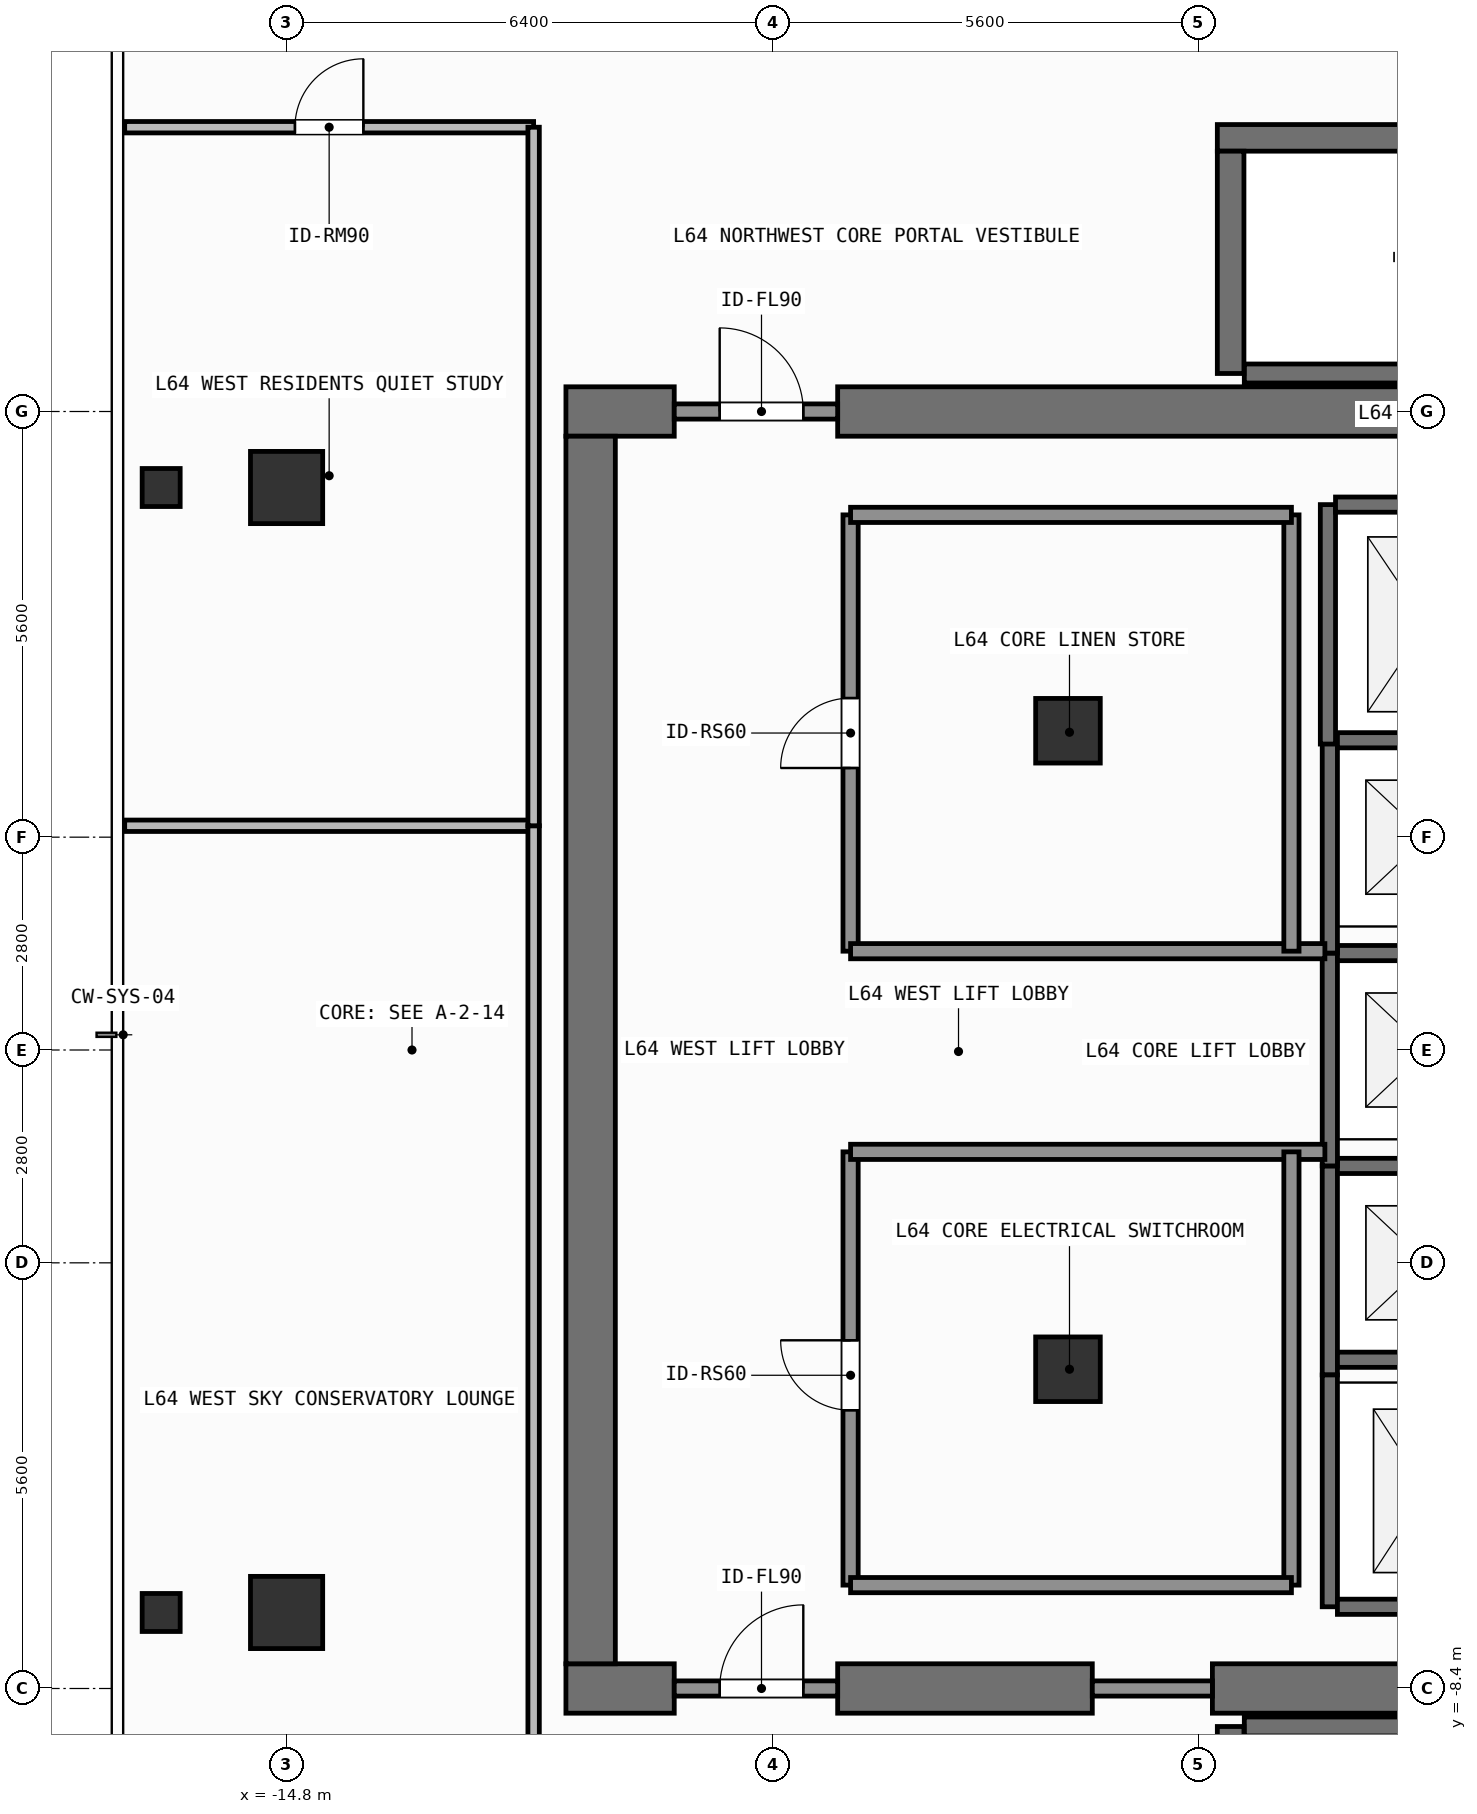
"""IFC4 building model, lengths in metres.
Left out: names, types, materials, properties, quantities, classifications, styles, units other than length and angle.
Written with IfcOpenShell. Run it as: python <this file> out.ifc"""

import sys

from ifc_helpers import new_model, si_unit, direction, frame, frame_2d, origin, origin_2d, place, context, subcontext, project, spatial, rectangle, hollow_rectangle, extrude, element, fill, save


model = new_model("IFC4")
c1 = context("Model", 3, precision=1e-05, world=origin(), true_north=direction((0.0, 1.0)))
c2 = subcontext(c1, "Body", "Model", "MODEL_VIEW")
j1 = project(units=[si_unit("LENGTHUNIT", "METRE"), si_unit("PLANEANGLEUNIT", "RADIAN")], contexts=[c1])
p1 = place(None, origin())
s1 = spatial("IfcSite", under=j1, at=p1, CompositionType="ELEMENT")
p2 = place(p1, origin())
s2 = spatial("IfcBuilding", under=s1, at=p2, CompositionType="ELEMENT")
p3 = place(p2, frame((0.0, 0.0, 262.5)))
s3 = spatial("IfcBuildingStorey", under=s2, at=p3, CompositionType="ELEMENT", Elevation=262.5)
p4 = place(p3, frame((-11.125, -8.4, 0.0), z_axis=(0.0, 0.0, 1.0), x_axis=(1.0, 0.0, 0.0)))
e1 = element("IfcWall", 1, at=p4, inside=s3, PredefinedType="SHEAR", context=c2, shape_type="SweptSolid", body=[
    extrude(rectangle(XDim=1.425, YDim=0.65, at=frame_2d((0.712, 0.0))), origin(), (0.0, 0.0, 1.0), 3.9),
])
p5 = place(p3, frame((-7.55, -8.4, 0.0), z_axis=(0.0, 0.0, 1.0), x_axis=(1.0, 0.0, 0.0)))
e2 = element("IfcWall", 2, at=p5, inside=s3, PredefinedType="SHEAR", context=c2, shape_type="SweptSolid", body=[
    extrude(rectangle(XDim=3.35, YDim=0.65, at=frame_2d((1.675, 0.0))), origin(), (0.0, 0.0, 1.0), 3.9),
])
p6 = place(p3, frame((-2.62, -8.4, 0.0), z_axis=(0.0, 0.0, 1.0), x_axis=(1.0, 0.0, 0.0)))
e3 = element("IfcWall", 3, at=p6, inside=s3, PredefinedType="SHEAR", context=c2, shape_type="SweptSolid", body=[
    extrude(rectangle(XDim=7.27, YDim=0.65, at=frame_2d((3.635, 0.0))), origin(), (0.0, 0.0, 1.0), 3.9),
])
p7 = place(p3, frame((-11.125, 8.4, 0.0), z_axis=(0.0, 0.0, 1.0), x_axis=(1.0, 0.0, 0.0)))
e4 = element("IfcWall", 4, at=p7, inside=s3, PredefinedType="SHEAR", context=c2, shape_type="SweptSolid", body=[
    extrude(rectangle(XDim=1.425, YDim=0.65, at=frame_2d((0.712, 0.0))), origin(), (0.0, 0.0, 1.0), 3.9),
])
p8 = place(p3, frame((-7.55, 8.4, 0.0), z_axis=(0.0, 0.0, 1.0), x_axis=(1.0, 0.0, 0.0)))
e5 = element("IfcWall", 5, at=p8, inside=s3, PredefinedType="SHEAR", context=c2, shape_type="SweptSolid", body=[
    extrude(rectangle(XDim=16.275, YDim=0.65, at=frame_2d((8.138, 0.0))), origin(), (0.0, 0.0, 1.0), 3.9),
])
p9 = place(p3, frame((-10.8, -8.075, 0.0), z_axis=(0.0, 0.0, 1.0), x_axis=(0.0, 1.0, 0.0)))
e6 = element("IfcWall", 6, at=p9, inside=s3, PredefinedType="SHEAR", context=c2, shape_type="SweptSolid", body=[
    extrude(rectangle(XDim=16.15, YDim=0.65, at=frame_2d((8.075, 0.0))), origin(), (0.0, 0.0, 1.0), 3.9),
])
p10 = place(p3, frame((-2.2, -8.9, 0.0), z_axis=(0.0, 0.0, 1.0), x_axis=(1.0, 0.0, 0.0)))
e7 = element("IfcWall", 7, at=p10, inside=s3, PredefinedType="SHEAR", context=c2, shape_type="SweptSolid", body=[
    extrude(rectangle(XDim=6.6, YDim=0.25, at=frame_2d((3.3, 0.0))), origin(), (0.0, 0.0, 1.0), 3.9),
])
p11 = place(p3, frame((-2.38, -11.825, 0.0), z_axis=(0.0, 0.0, 1.0), x_axis=(0.0, 1.0, 0.0)))
e8 = element("IfcWall", 8, at=p11, inside=s3, PredefinedType="SHEAR", context=c2, shape_type="SweptSolid", body=[
    extrude(rectangle(XDim=2.925, YDim=0.35, at=frame_2d((1.462, 0.0))), origin(), (0.0, 0.0, 1.0), 3.9),
])
p12 = place(p3, frame((-2.555, 12.0, 0.0), z_axis=(0.0, 0.0, 1.0), x_axis=(1.0, 0.0, 0.0)))
e9 = element("IfcWall", 9, at=p12, inside=s3, PredefinedType="SHEAR", context=c2, shape_type="SweptSolid", body=[
    extrude(rectangle(XDim=7.31, YDim=0.35, at=frame_2d((3.655, 0.0))), origin(), (0.0, 0.0, 1.0), 3.9),
])
p13 = place(p3, frame((-2.2, 8.9, 0.0), z_axis=(0.0, 0.0, 1.0), x_axis=(1.0, 0.0, 0.0)))
e10 = element("IfcWall", 10, at=p13, inside=s3, PredefinedType="SHEAR", context=c2, shape_type="SweptSolid", body=[
    extrude(rectangle(XDim=6.6, YDim=0.25, at=frame_2d((3.3, 0.0))), origin(), (0.0, 0.0, 1.0), 3.9),
])
p14 = place(p3, frame((-2.38, 8.9, 0.0), z_axis=(0.0, 0.0, 1.0), x_axis=(0.0, 1.0, 0.0)))
e11 = element("IfcWall", 11, at=p14, inside=s3, PredefinedType="SHEAR", context=c2, shape_type="SweptSolid", body=[
    extrude(rectangle(XDim=2.925, YDim=0.35, at=frame_2d((1.462, 0.0))), origin(), (0.0, 0.0, 1.0), 3.9),
])
for number, where, z_axis, x_axis in (
    (12, (-14.8, -7.4, 0.0), (0.0, 0.0, 1.0), (1.0, 0.0, 0.0)),
    (13, (-14.8, 7.4, 0.0), (0.0, 0.0, 1.0), (1.0, 0.0, 0.0)),
):
    element("IfcColumn", number, at=place(p3, frame(where, z_axis=z_axis, x_axis=x_axis)), inside=s3, PredefinedType="COLUMN", context=c2, shape_type="SweptSolid", body=[
        extrude(rectangle(XDim=0.95, YDim=0.95, at=origin_2d()), origin(), (0.0, 0.0, 1.0), 3.9),
    ])
for number, where, z_axis, x_axis in (
    (14, (-4.52, -4.2, 0.0), (0.0, 0.0, 1.0), (1.0, 0.0, 0.0)),
    (15, (-4.52, 4.2, 0.0), (0.0, 0.0, 1.0), (1.0, 0.0, 0.0)),
):
    element("IfcColumn", number, at=place(p3, frame(where, z_axis=z_axis, x_axis=x_axis)), inside=s3, PredefinedType="COLUMN", context=c2, shape_type="SweptSolid", body=[
        extrude(rectangle(XDim=0.85, YDim=0.85, at=origin_2d()), origin(), (0.0, 0.0, 1.0), 3.9),
    ])
for number, where, z_axis, x_axis in (
    (16, (-16.45, -7.4, 0.0), (0.0, 0.0, 1.0), (1.0, 0.0, 0.0)),
    (17, (-16.45, 7.4, 0.0), (0.0, 0.0, 1.0), (1.0, 0.0, 0.0)),
):
    element("IfcColumn", number, at=place(p3, frame(where, z_axis=z_axis, x_axis=x_axis)), inside=s3, PredefinedType="COLUMN", context=c2, shape_type="SweptSolid", body=[
        extrude(hollow_rectangle(XDim=0.5, YDim=0.5, WallThickness=0.025, at=origin_2d()), origin(), (0.0, 0.0, 1.0), 3.9),
    ])
p15 = place(p3, frame((-1.075, -4.275, 0.0), z_axis=(0.0, 0.0, 1.0), x_axis=(0.0, 1.0, 0.0)))
e18 = element("IfcWall", 18, at=p15, inside=s3, PredefinedType="SHEAR", context=c2, shape_type="SweptSolid", body=[
    extrude(rectangle(XDim=2.75, YDim=0.2, at=frame_2d((1.375, 0.0))), origin(), (0.0, 0.0, 1.0), 3.68),
])
for number, where, z_axis, x_axis in (
    (19, (-0.975, -4.075, 0.0), (0.0, 0.0, 1.0), (1.0, 0.0, 0.0)),
    (20, (-0.975, -1.525, 0.0), (0.0, 0.0, 1.0), (1.0, 0.0, 0.0)),
):
    element("IfcWall", number, at=place(p3, frame(where, z_axis=z_axis, x_axis=x_axis)), inside=s3, PredefinedType="SHEAR", context=c2, shape_type="SweptSolid", body=[
        extrude(rectangle(XDim=2.35, YDim=0.2, at=frame_2d((1.175, 0.0))), origin(), (0.0, 0.0, 1.0), 3.68),
    ])
p16 = place(p3, frame((-1.075, -1.525, 0.0), z_axis=(0.0, 0.0, 1.0), x_axis=(0.0, 1.0, 0.0)))
e21 = element("IfcWall", 21, at=p16, inside=s3, PredefinedType="SHEAR", context=c2, shape_type="SweptSolid", body=[
    extrude(rectangle(XDim=2.8, YDim=0.2, at=frame_2d((1.4, 0.0))), origin(), (0.0, 0.0, 1.0), 3.68),
])
p17 = place(p3, frame((-0.975, 1.275, 0.0), z_axis=(0.0, 0.0, 1.0), x_axis=(1.0, 0.0, 0.0)))
e22 = element("IfcWall", 22, at=p17, inside=s3, PredefinedType="SHEAR", context=c2, shape_type="SweptSolid", body=[
    extrude(rectangle(XDim=2.35, YDim=0.2, at=frame_2d((1.175, 0.0))), origin(), (0.0, 0.0, 1.0), 3.68),
])
p18 = place(p3, frame((-1.075, 1.275, 0.0), z_axis=(0.0, 0.0, 1.0), x_axis=(0.0, 1.0, 0.0)))
e23 = element("IfcWall", 23, at=p18, inside=s3, PredefinedType="SHEAR", context=c2, shape_type="SweptSolid", body=[
    extrude(rectangle(XDim=2.8, YDim=0.2, at=frame_2d((1.4, 0.0))), origin(), (0.0, 0.0, 1.0), 3.68),
])
p19 = place(p3, frame((-0.975, 4.075, 0.0), z_axis=(0.0, 0.0, 1.0), x_axis=(1.0, 0.0, 0.0)))
e24 = element("IfcWall", 24, at=p19, inside=s3, PredefinedType="SHEAR", context=c2, shape_type="SweptSolid", body=[
    extrude(rectangle(XDim=2.35, YDim=0.2, at=frame_2d((1.175, 0.0))), origin(), (0.0, 0.0, 1.0), 3.68),
])
p20 = place(p3, frame((-1.1, 4.025, 0.0), z_axis=(0.0, 0.0, 1.0), x_axis=(0.0, 1.0, 0.0)))
e25 = element("IfcWall", 25, at=p20, inside=s3, PredefinedType="SHEAR", context=c2, shape_type="SweptSolid", body=[
    extrude(rectangle(XDim=3.15, YDim=0.2, at=frame_2d((1.575, 0.0))), origin(), (0.0, 0.0, 1.0), 3.68),
])
p21 = place(p3, frame((-1.0, 7.175, 0.0), z_axis=(0.0, 0.0, 1.0), x_axis=(1.0, 0.0, 0.0)))
e26 = element("IfcWall", 26, at=p21, inside=s3, PredefinedType="SHEAR", context=c2, shape_type="SweptSolid", body=[
    extrude(rectangle(XDim=2.4, YDim=0.2, at=frame_2d((1.2, 0.0))), origin(), (0.0, 0.0, 1.0), 3.68),
])
p22 = place(p3, frame((-1.075, -7.325, 0.0), z_axis=(0.0, 0.0, 1.0), x_axis=(0.0, 1.0, 0.0)))
e27 = element("IfcWall", 27, at=p22, inside=s3, PredefinedType="SHEAR", context=c2, shape_type="SweptSolid", body=[
    extrude(rectangle(XDim=3.05, YDim=0.2, at=frame_2d((1.525, 0.0))), origin(), (0.0, 0.0, 1.0), 3.68),
])
p23 = place(p3, frame((-0.975, -7.325, 0.0), z_axis=(0.0, 0.0, 1.0), x_axis=(1.0, 0.0, 0.0)))
e28 = element("IfcWall", 28, at=p23, inside=s3, PredefinedType="SHEAR", context=c2, shape_type="SweptSolid", body=[
    extrude(rectangle(XDim=2.35, YDim=0.2, at=frame_2d((1.175, 0.0))), origin(), (0.0, 0.0, 1.0), 3.68),
])
p24 = place(p3, frame((-9.7, -8.4, 0.0), z_axis=(0.0, 0.0, 1.0), x_axis=(1.0, 0.0, 0.0)))
e29 = element("IfcWall", 29, at=p24, inside=s3, PredefinedType="SOLIDWALL", context=c2, shape_type="SweptSolid", body=[
    extrude(rectangle(XDim=2.15, YDim=0.2, at=frame_2d((1.075, 0.0))), origin(), (0.0, 0.0, 1.0), 2.92),
])
p25 = place(p24, frame((0.598, 0.0, 0.0)))
e30 = element("IfcOpeningElement", 30, at=p25, cuts=e29, PredefinedType="OPENING", context=c2, shape_type="SweptSolid", body=[
    extrude(rectangle(XDim=1.1, YDim=2.15, at=frame_2d((0.55, 1.075))), frame((0.0, 0.11, 0.0), z_axis=(0.0, -1.0, 0.0), x_axis=(1.0, 0.0, 0.0)), (0.0, 0.0, 1.0), 0.22),
])
p26 = place(p3, frame((-9.7, 8.4, 0.0), z_axis=(0.0, 0.0, 1.0), x_axis=(1.0, 0.0, 0.0)))
e31 = element("IfcWall", 31, at=p26, inside=s3, PredefinedType="SOLIDWALL", context=c2, shape_type="SweptSolid", body=[
    extrude(rectangle(XDim=2.15, YDim=0.2, at=frame_2d((1.075, 0.0))), origin(), (0.0, 0.0, 1.0), 2.92),
])
p27 = place(p26, frame((0.598, 0.0, 0.0)))
e32 = element("IfcOpeningElement", 32, at=p27, cuts=e31, PredefinedType="OPENING", context=c2, shape_type="SweptSolid", body=[
    extrude(rectangle(XDim=1.1, YDim=2.15, at=frame_2d((0.55, 1.075))), frame((0.0, 0.11, 0.0), z_axis=(0.0, -1.0, 0.0), x_axis=(1.0, 0.0, 0.0)), (0.0, 0.0, 1.0), 0.22),
])
p28 = place(p3, frame((-7.38, -7.04, 0.0), z_axis=(0.0, 0.0, 1.0), x_axis=(0.0, 1.0, 0.0)))
e33 = element("IfcWall", 33, at=p28, inside=s3, PredefinedType="SOLIDWALL", context=c2, shape_type="SweptSolid", body=[
    extrude(rectangle(XDim=5.7, YDim=0.2, at=frame_2d((2.85, 0.0))), origin(), (0.0, 0.0, 1.0), 3.68),
])
p29 = place(p28, frame((2.301, 0.0, 0.0)))
e34 = element("IfcOpeningElement", 34, at=p29, cuts=e33, PredefinedType="OPENING", context=c2, shape_type="SweptSolid", body=[
    extrude(rectangle(XDim=0.92, YDim=2.1, at=frame_2d((0.46, 1.05))), frame((0.0, 0.11, 0.0), z_axis=(0.0, -1.0, 0.0), x_axis=(1.0, 0.0, 0.0)), (0.0, 0.0, 1.0), 0.22),
])
p30 = place(p3, frame((-7.38, 1.3, 0.0), z_axis=(0.0, 0.0, 1.0), x_axis=(0.0, 1.0, 0.0)))
e35 = element("IfcWall", 35, at=p30, inside=s3, PredefinedType="SOLIDWALL", context=c2, shape_type="SweptSolid", body=[
    extrude(rectangle(XDim=5.74, YDim=0.2, at=frame_2d((2.87, 0.0))), origin(), (0.0, 0.0, 1.0), 3.68),
])
p31 = place(p30, frame((2.41, 0.0, 0.0)))
e36 = element("IfcOpeningElement", 36, at=p31, cuts=e35, PredefinedType="OPENING", context=c2, shape_type="SweptSolid", body=[
    extrude(rectangle(XDim=0.92, YDim=2.1, at=frame_2d((0.46, 1.05))), frame((0.0, 0.11, 0.0), z_axis=(0.0, -1.0, 0.0), x_axis=(1.0, 0.0, 0.0)), (0.0, 0.0, 1.0), 0.22),
])
p32 = place(p3, frame((-16.93, 12.14, 0.0), z_axis=(0.0, 0.0, 1.0), x_axis=(1.0, 0.0, 0.0)))
e37 = element("IfcWall", 37, at=p32, inside=s3, PredefinedType="PARTITIONING", context=c2, shape_type="SweptSolid", body=[
    extrude(rectangle(XDim=5.38, YDim=0.15, at=frame_2d((2.69, 0.0))), origin(), (0.0, 0.0, 1.0), 3.68),
])
p33 = place(p32, frame((2.24, 0.0, 0.0)))
e38 = element("IfcOpeningElement", 38, at=p33, cuts=e37, PredefinedType="OPENING", context=c2, shape_type="SweptSolid", body=[
    extrude(rectangle(XDim=0.9, YDim=2.1, at=frame_2d((0.45, 1.05))), frame((0.0, 0.085, 0.0), z_axis=(0.0, -1.0, 0.0), x_axis=(1.0, 0.0, 0.0)), (0.0, 0.0, 1.0), 0.17),
])
p34 = place(p3, frame((-4.2, -8.4, 0.0), z_axis=(0.0, 0.0, 1.0), x_axis=(1.0, 0.0, 0.0)))
e39 = element("IfcWall", 39, at=p34, inside=s3, PredefinedType="SOLIDWALL", context=c2, shape_type="SweptSolid", body=[
    extrude(rectangle(XDim=1.58, YDim=0.2, at=frame_2d((0.79, 0.0))), origin(), (0.0, 0.0, 1.0), 2.92),
])
for number, where, z_axis, x_axis in (
    (40, (-7.38, -1.34, 0.0), (0.0, 0.0, 1.0), (1.0, 0.0, 0.0)),
    (41, (-7.38, 1.3, 0.0), (0.0, 0.0, 1.0), (1.0, 0.0, 0.0)),
):
    element("IfcWall", number, at=place(p3, frame(where, z_axis=z_axis, x_axis=x_axis)), inside=s3, PredefinedType="SOLIDWALL", context=c2, shape_type="SweptSolid", body=[
        extrude(rectangle(XDim=6.24, YDim=0.2, at=frame_2d((3.12, 0.0))), origin(), (0.0, 0.0, 1.0), 3.68),
    ])
p35 = place(p3, frame((-1.58, -7.04, 0.0), z_axis=(0.0, 0.0, 1.0), x_axis=(0.0, 1.0, 0.0)))
e42 = element("IfcWall", 42, at=p35, inside=s3, PredefinedType="SOLIDWALL", context=c2, shape_type="SweptSolid", body=[
    extrude(rectangle(XDim=5.7, YDim=0.2, at=frame_2d((2.85, 0.0))), origin(), (0.0, 0.0, 1.0), 3.68),
])
p36 = place(p3, frame((-7.38, -7.04, 0.0), z_axis=(0.0, 0.0, 1.0), x_axis=(1.0, 0.0, 0.0)))
e43 = element("IfcWall", 43, at=p36, inside=s3, PredefinedType="SOLIDWALL", context=c2, shape_type="SweptSolid", body=[
    extrude(rectangle(XDim=5.8, YDim=0.2, at=frame_2d((2.9, 0.0))), origin(), (0.0, 0.0, 1.0), 3.68),
])
p37 = place(p3, frame((-1.58, 1.3, 0.0), z_axis=(0.0, 0.0, 1.0), x_axis=(0.0, 1.0, 0.0)))
e44 = element("IfcWall", 44, at=p37, inside=s3, PredefinedType="SOLIDWALL", context=c2, shape_type="SweptSolid", body=[
    extrude(rectangle(XDim=5.74, YDim=0.2, at=frame_2d((2.87, 0.0))), origin(), (0.0, 0.0, 1.0), 3.68),
])
p38 = place(p3, frame((-7.38, 7.04, 0.0), z_axis=(0.0, 0.0, 1.0), x_axis=(1.0, 0.0, 0.0)))
e45 = element("IfcWall", 45, at=p38, inside=s3, PredefinedType="SOLIDWALL", context=c2, shape_type="SweptSolid", body=[
    extrude(rectangle(XDim=5.8, YDim=0.2, at=frame_2d((2.9, 0.0))), origin(), (0.0, 0.0, 1.0), 3.68),
])
p39 = place(p3, frame((-16.93, 2.95, 0.0), z_axis=(0.0, 0.0, 1.0), x_axis=(1.0, 0.0, 0.0)))
e46 = element("IfcWall", 46, at=p39, inside=s3, PredefinedType="PARTITIONING", context=c2, shape_type="SweptSolid", body=[
    extrude(rectangle(XDim=5.38, YDim=0.15, at=frame_2d((2.69, 0.0))), origin(), (0.0, 0.0, 1.0), 3.68),
])
p40 = place(p3, frame((-11.55, -12.14, 0.0), z_axis=(0.0, 0.0, 1.0), x_axis=(0.0, 1.0, 0.0)))
e47 = element("IfcWall", 47, at=p40, inside=s3, PredefinedType="PARTITIONING", context=c2, shape_type="SweptSolid", body=[
    extrude(rectangle(XDim=15.09, YDim=0.15, at=frame_2d((7.545, 0.0))), origin(), (0.0, 0.0, 1.0), 3.68),
])
p41 = place(p3, frame((-11.55, 2.95, 0.0), z_axis=(0.0, 0.0, 1.0), x_axis=(0.0, 1.0, 0.0)))
e48 = element("IfcWall", 48, at=p41, inside=s3, PredefinedType="PARTITIONING", context=c2, shape_type="SweptSolid", body=[
    extrude(rectangle(XDim=9.19, YDim=0.15, at=frame_2d((4.595, 0.0))), origin(), (0.0, 0.0, 1.0), 3.68),
])
p42 = place(p25, origin())
e49 = element("IfcDoor", 49, at=p42, inside=s3, OperationType="SINGLE_SWING_RIGHT", PredefinedType="DOOR", context=c2, shape_type="SweptSolid", body=[
    extrude(rectangle(XDim=1.1, YDim=2.15, at=frame_2d((0.55, 1.075))), frame((0.0, 0.025, 0.0), z_axis=(0.0, -1.0, 0.0), x_axis=(1.0, 0.0, 0.0)), (0.0, 0.0, 1.0), 0.05),
])
fill(e30, e49)
p43 = place(p27, origin())
e50 = element("IfcDoor", 50, at=p43, inside=s3, OperationType="SINGLE_SWING_LEFT", PredefinedType="DOOR", context=c2, shape_type="SweptSolid", body=[
    extrude(rectangle(XDim=1.1, YDim=2.15, at=frame_2d((0.55, 1.075))), frame((0.0, 0.025, 0.0), z_axis=(0.0, -1.0, 0.0), x_axis=(1.0, 0.0, 0.0)), (0.0, 0.0, 1.0), 0.05),
])
fill(e32, e50)
p44 = place(p29, origin())
e51 = element("IfcDoor", 51, at=p44, inside=s3, OperationType="SINGLE_SWING_RIGHT", PredefinedType="DOOR", context=c2, shape_type="SweptSolid", body=[
    extrude(rectangle(XDim=0.92, YDim=2.1, at=frame_2d((0.46, 1.05))), frame((0.0, 0.025, 0.0), z_axis=(0.0, -1.0, 0.0), x_axis=(1.0, 0.0, 0.0)), (0.0, 0.0, 1.0), 0.05),
])
fill(e34, e51)
p45 = place(p31, origin())
e52 = element("IfcDoor", 52, at=p45, inside=s3, OperationType="SINGLE_SWING_LEFT", PredefinedType="DOOR", context=c2, shape_type="SweptSolid", body=[
    extrude(rectangle(XDim=0.92, YDim=2.1, at=frame_2d((0.46, 1.05))), frame((0.0, 0.025, 0.0), z_axis=(0.0, -1.0, 0.0), x_axis=(1.0, 0.0, 0.0)), (0.0, 0.0, 1.0), 0.05),
])
fill(e36, e52)
p46 = place(p33, origin())
e53 = element("IfcDoor", 53, at=p46, inside=s3, OperationType="SINGLE_SWING_RIGHT", PredefinedType="DOOR", context=c2, shape_type="SweptSolid", body=[
    extrude(rectangle(XDim=0.9, YDim=2.1, at=frame_2d((0.45, 1.05))), frame((0.0, 0.025, 0.0), z_axis=(0.0, -1.0, 0.0), x_axis=(1.0, 0.0, 0.0)), (0.0, 0.0, 1.0), 0.05),
])
fill(e38, e53)
save(model, sys.argv[1])
